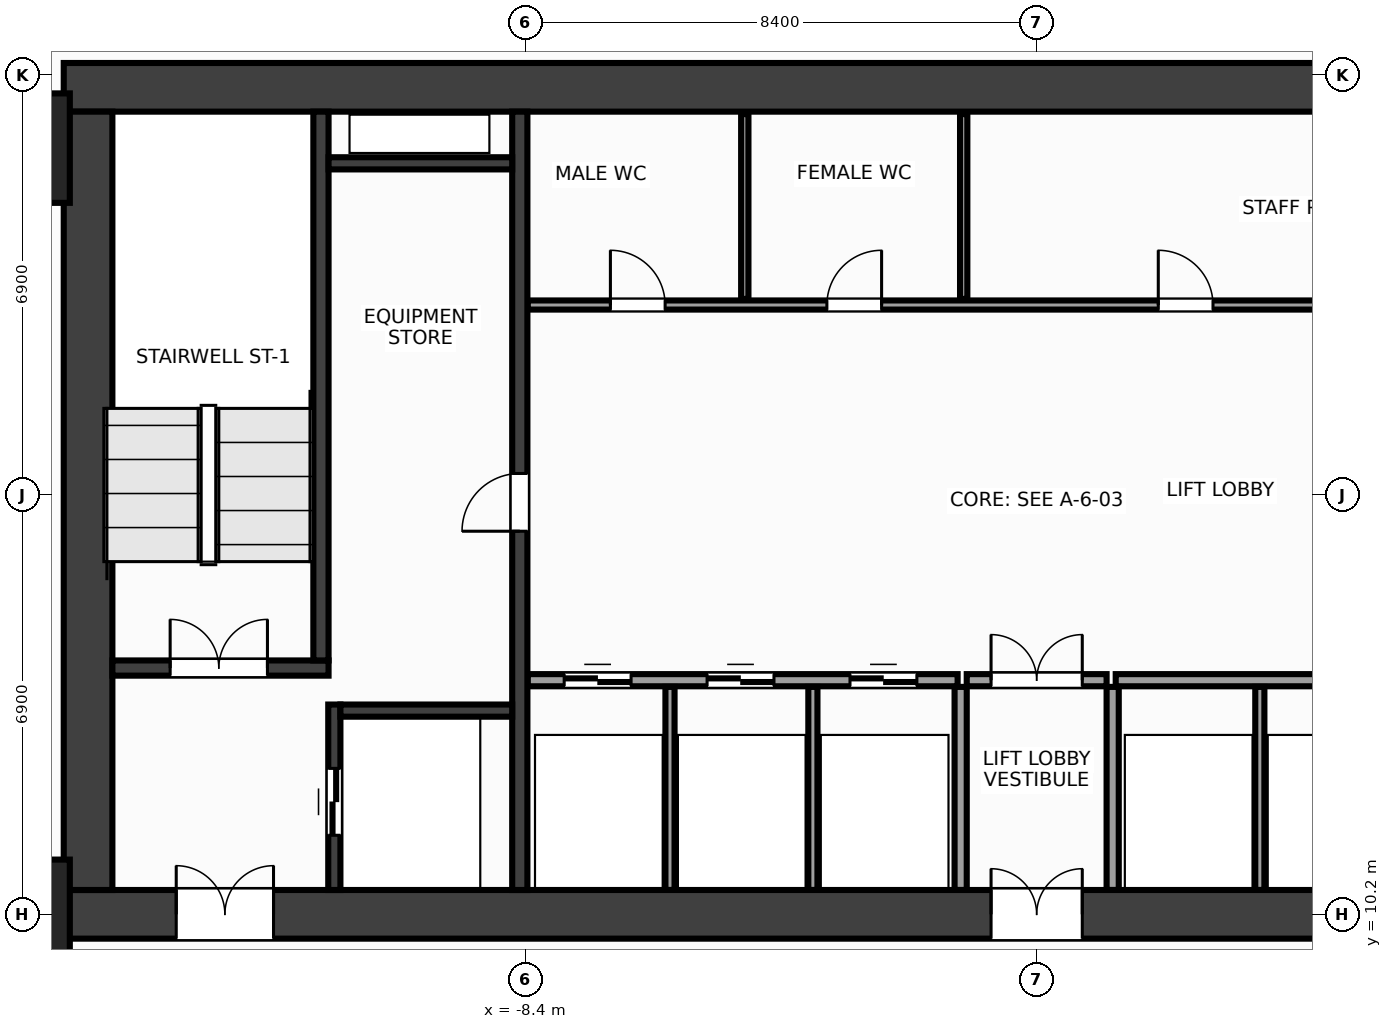
"""IFC4 building model, lengths in metres.
Left out: names, types, materials, properties, quantities, classifications, styles, units other than length and angle.
Written with IfcOpenShell. Run it as: python <this file> out.ifc"""

import sys

from ifc_helpers import new_model, si_unit, direction, frame, frame_2d, origin, origin_2d, place, context, subcontext, project, spatial, rectangle, extrude, source, transform, mapped, element, fill, save


model = new_model("IFC4")
c1 = context("Model", 3, precision=1e-05, world=origin(), true_north=direction((0.0, 1.0)))
c2 = subcontext(c1, "Body", "Model", "MODEL_VIEW")
j1 = project(units=[si_unit("LENGTHUNIT", "METRE"), si_unit("PLANEANGLEUNIT", "RADIAN")], contexts=[c1])
p1 = place(None, origin())
s1 = spatial("IfcSite", under=j1, at=p1, CompositionType="ELEMENT")
p2 = place(p1, origin())
s2 = spatial("IfcBuilding", under=s1, at=p2, CompositionType="ELEMENT")
p3 = place(p2, frame((0.0, 0.0, 63.2)))
s3 = spatial("IfcBuildingStorey", under=s2, at=p3, CompositionType="ELEMENT", Elevation=63.2)
m1 = source(origin(), c2, "Body", "SweptSolid", [
    extrude(rectangle(XDim=32.0, YDim=0.8, at=frame_2d((16.0, 0.0))), origin(), (0.0, 0.0, 1.0), 3.6),
])
p4 = place(p3, frame((-16.0, 23.8, 0.0), z_axis=(0.0, 0.0, 1.0), x_axis=(1.0, 0.0, 0.0)))
e1 = element("IfcWall", 1, at=p4, inside=s3, PredefinedType="SHEAR", context=c2, shape_type="MappedRepresentation", body=[
    mapped(m1, transform((0.0, 0.0, 0.0), x_axis=(1.0, 0.0, 0.0), y_axis=(0.0, 1.0, 0.0), z_axis=(0.0, 0.0, 1.0), scale=1.0)),
])
p5 = place(p3, frame((-16.0, 10.2, 0.0), z_axis=(0.0, 0.0, 1.0), x_axis=(1.0, 0.0, 0.0)))
e2 = element("IfcWall", 2, at=p5, inside=s3, PredefinedType="SHEAR", context=c2, shape_type="MappedRepresentation", body=[
    mapped(m1, transform((0.0, 0.0, 0.0), x_axis=(1.0, 0.0, 0.0), y_axis=(0.0, 1.0, 0.0), z_axis=(0.0, 0.0, 1.0), scale=1.0)),
])
p6 = place(p5, frame((1.85, 0.0, 0.0)))
e3 = element("IfcOpeningElement", 3, at=p6, cuts=e2, PredefinedType="OPENING", context=c2, shape_type="SweptSolid", body=[
    extrude(rectangle(XDim=1.6, YDim=2.15, at=frame_2d((0.8, 1.075))), frame((0.0, 0.412, 0.0), z_axis=(0.0, -1.0, 0.0), x_axis=(1.0, 0.0, 0.0)), (0.0, 0.0, 1.0), 0.824),
])
p7 = place(p5, frame((28.55, 0.0, 0.0)))
e4 = element("IfcOpeningElement", 4, at=p7, cuts=e2, PredefinedType="OPENING", context=c2, shape_type="SweptSolid", body=[
    extrude(rectangle(XDim=1.6, YDim=2.15, at=frame_2d((0.8, 1.075))), frame((0.0, 0.412, 0.0), z_axis=(0.0, -1.0, 0.0), x_axis=(1.0, 0.0, 0.0)), (0.0, 0.0, 1.0), 0.824),
])
p8 = place(p5, frame((15.25, 0.0, 0.0)))
e5 = element("IfcOpeningElement", 5, at=p8, cuts=e2, PredefinedType="OPENING", context=c2, shape_type="SweptSolid", body=[
    extrude(rectangle(XDim=1.5, YDim=2.2, at=frame_2d((0.75, 1.1))), frame((0.0, 0.412, 0.0), z_axis=(0.0, -1.0, 0.0), x_axis=(1.0, 0.0, 0.0)), (0.0, 0.0, 1.0), 0.824),
])
m2 = source(origin(), c2, "Body", "SweptSolid", [
    extrude(rectangle(XDim=12.8, YDim=0.8, at=frame_2d((6.4, 0.0))), origin(), (0.0, 0.0, 1.0), 3.6),
])
p9 = place(p3, frame((-15.6, 10.6, 0.0), z_axis=(0.0, 0.0, 1.0), x_axis=(0.0, 1.0, 0.0)))
e6 = element("IfcWall", 6, at=p9, inside=s3, PredefinedType="SHEAR", context=c2, shape_type="MappedRepresentation", body=[
    mapped(m2, transform((0.0, 0.0, 0.0), x_axis=(1.0, 0.0, 0.0), y_axis=(0.0, 1.0, 0.0), z_axis=(0.0, 0.0, 1.0), scale=1.0)),
])
m3 = source(origin(), c2, "Body", "SweptSolid", [
    extrude(rectangle(XDim=12.8, YDim=0.25, at=frame_2d((6.4, 0.0))), origin(), (0.0, 0.0, 1.0), 3.6),
])
p10 = place(p3, frame((-8.5, 10.6, 0.0), z_axis=(0.0, 0.0, 1.0), x_axis=(0.0, 1.0, 0.0)))
e7 = element("IfcWall", 7, at=p10, inside=s3, PredefinedType="SHEAR", context=c2, shape_type="MappedRepresentation", body=[
    mapped(m3, transform((0.0, 0.0, 0.0), x_axis=(1.0, 0.0, 0.0), y_axis=(0.0, 1.0, 0.0), z_axis=(0.0, 0.0, 1.0), scale=1.0)),
])
p11 = place(p10, frame((5.9, 0.0, 0.0)))
e8 = element("IfcOpeningElement", 8, at=p11, cuts=e7, PredefinedType="OPENING", context=c2, shape_type="SweptSolid", body=[
    extrude(rectangle(XDim=0.95, YDim=2.15, at=frame_2d((0.475, 1.075))), frame((0.0, 0.137, 0.0), z_axis=(0.0, -1.0, 0.0), x_axis=(1.0, 0.0, 0.0)), (0.0, 0.0, 1.0), 0.274),
])
m4 = source(origin(), c2, "Body", "SweptSolid", [
    extrude(rectangle(XDim=3.555, YDim=0.25, at=frame_2d((1.777, 0.0))), origin(), (0.0, 0.0, 1.0), 3.6),
])
p12 = place(p3, frame((-15.2, 14.25, 0.0), z_axis=(0.0, 0.0, 1.0), x_axis=(1.0, 0.0, 0.0)))
e9 = element("IfcWall", 9, at=p12, inside=s3, PredefinedType="SHEAR", context=c2, shape_type="MappedRepresentation", body=[
    mapped(m4, transform((0.0, 0.0, 0.0), x_axis=(1.0, 0.0, 0.0), y_axis=(0.0, 1.0, 0.0), z_axis=(0.0, 0.0, 1.0), scale=1.0)),
])
p13 = place(p12, frame((0.95, 0.0, 0.0)))
e10 = element("IfcOpeningElement", 10, at=p13, cuts=e9, PredefinedType="OPENING", context=c2, shape_type="SweptSolid", body=[
    extrude(rectangle(XDim=1.6, YDim=2.15, at=frame_2d((0.8, 1.075))), frame((0.0, 0.137, 0.0), z_axis=(0.0, -1.0, 0.0), x_axis=(1.0, 0.0, 0.0)), (0.0, 0.0, 1.0), 0.274),
])
m5 = source(origin(), c2, "Body", "SweptSolid", [
    extrude(rectangle(XDim=9.025, YDim=0.25, at=frame_2d((4.512, 0.0))), origin(), (0.0, 0.0, 1.0), 3.6),
])
p14 = place(p3, frame((-11.77, 14.375, 0.0), z_axis=(0.0, 0.0, 1.0), x_axis=(0.0, 1.0, 0.0)))
e11 = element("IfcWall", 11, at=p14, inside=s3, PredefinedType="SHEAR", context=c2, shape_type="MappedRepresentation", body=[
    mapped(m5, transform((0.0, 0.0, 0.0), x_axis=(1.0, 0.0, 0.0), y_axis=(0.0, 1.0, 0.0), z_axis=(0.0, 0.0, 1.0), scale=1.0)),
])
m6 = source(origin(), c2, "Body", "SweptSolid", [
    extrude(rectangle(XDim=3.05, YDim=0.2, at=frame_2d((1.525, 0.0))), origin(), (0.0, 0.0, 1.0), 3.6),
])
p15 = place(p3, frame((-11.55, 10.6, 0.0), z_axis=(0.0, 0.0, 1.0), x_axis=(0.0, 1.0, 0.0)))
e12 = element("IfcWall", 12, at=p15, inside=s3, PredefinedType="SHEAR", context=c2, shape_type="MappedRepresentation", body=[
    mapped(m6, transform((0.0, 0.0, 0.0), x_axis=(1.0, 0.0, 0.0), y_axis=(0.0, 1.0, 0.0), z_axis=(0.0, 0.0, 1.0), scale=1.0)),
])
p16 = place(p15, frame((0.9, 0.0, 0.0)))
e13 = element("IfcOpeningElement", 13, at=p16, cuts=e12, PredefinedType="OPENING", context=c2, shape_type="SweptSolid", body=[
    extrude(rectangle(XDim=1.1, YDim=2.15, at=frame_2d((0.55, 1.075))), frame((0.0, 0.112, 0.0), z_axis=(0.0, -1.0, 0.0), x_axis=(1.0, 0.0, 0.0)), (0.0, 0.0, 1.0), 0.224),
])
m7 = source(origin(), c2, "Body", "SweptSolid", [
    extrude(rectangle(XDim=2.825, YDim=0.2, at=frame_2d((1.413, 0.0))), origin(), (0.0, 0.0, 1.0), 3.6),
])
p17 = place(p3, frame((-11.45, 13.55, 0.0), z_axis=(0.0, 0.0, 1.0), x_axis=(1.0, 0.0, 0.0)))
e14 = element("IfcWall", 14, at=p17, inside=s3, PredefinedType="SHEAR", context=c2, shape_type="MappedRepresentation", body=[
    mapped(m7, transform((0.0, 0.0, 0.0), x_axis=(1.0, 0.0, 0.0), y_axis=(0.0, 1.0, 0.0), z_axis=(0.0, 0.0, 1.0), scale=1.0)),
])
m8 = source(origin(), c2, "Body", "SweptSolid", [
    extrude(rectangle(XDim=3.02, YDim=0.2, at=frame_2d((1.51, 0.0))), origin(), (0.0, 0.0, 1.0), 3.6),
])
p18 = place(p3, frame((-11.645, 22.55, 0.0), z_axis=(0.0, 0.0, 1.0), x_axis=(1.0, 0.0, 0.0)))
e15 = element("IfcWall", 15, at=p18, inside=s3, PredefinedType="SHEAR", context=c2, shape_type="MappedRepresentation", body=[
    mapped(m8, transform((0.0, 0.0, 0.0), x_axis=(1.0, 0.0, 0.0), y_axis=(0.0, 1.0, 0.0), z_axis=(0.0, 0.0, 1.0), scale=1.0)),
])
m9 = source(origin(), c2, "Body", "SweptSolid", [
    extrude(rectangle(XDim=1.8, YDim=1.8, at=origin_2d()), origin(), (0.0, 0.0, 1.0), 3.6),
])
for number, where, z_axis, x_axis in (
    (16, (-16.8, 10.2, 0.0), (0.0, 0.0, 1.0), (1.0, 0.0, 0.0)),
    (17, (-16.8, 22.8, 0.0), (0.0, 0.0, 1.0), (1.0, 0.0, 0.0)),
):
    element("IfcColumn", number, at=place(p3, frame(where, z_axis=z_axis, x_axis=x_axis)), inside=s3, PredefinedType="COLUMN", context=c2, shape_type="MappedRepresentation", body=[
        mapped(m9, transform((0.0, 0.0, 0.0), x_axis=(1.0, 0.0, 0.0), y_axis=(0.0, 1.0, 0.0), z_axis=(0.0, 0.0, 1.0), scale=1.0)),
    ])
m10 = source(origin(), c2, "Body", "SweptSolid", [
    extrude(rectangle(XDim=7.07, YDim=0.2, at=frame_2d((3.535, 0.0))), origin(), (0.0, 0.0, 1.0), 3.36),
])
p19 = place(p3, frame((-8.37, 14.05, 0.0), z_axis=(0.0, 0.0, 1.0), x_axis=(1.0, 0.0, 0.0)))
e18 = element("IfcWall", 18, at=p19, inside=s3, PredefinedType="PARTITIONING", context=c2, shape_type="MappedRepresentation", body=[
    mapped(m10, transform((0.0, 0.0, 0.0), x_axis=(1.0, 0.0, 0.0), y_axis=(0.0, 1.0, 0.0), z_axis=(0.0, 0.0, 1.0), scale=1.0)),
])
p20 = place(p19, frame((0.6, 0.0, 0.0)))
e19 = element("IfcOpeningElement", 19, at=p20, cuts=e18, PredefinedType="OPENING", context=c2, shape_type="SweptSolid", body=[
    extrude(rectangle(XDim=1.1, YDim=2.15, at=frame_2d((0.55, 1.075))), frame((0.0, 0.112, 0.0), z_axis=(0.0, -1.0, 0.0), x_axis=(1.0, 0.0, 0.0)), (0.0, 0.0, 1.0), 0.224),
])
p21 = place(p19, frame((2.95, 0.0, 0.0)))
e20 = element("IfcOpeningElement", 20, at=p21, cuts=e18, PredefinedType="OPENING", context=c2, shape_type="SweptSolid", body=[
    extrude(rectangle(XDim=1.1, YDim=2.15, at=frame_2d((0.55, 1.075))), frame((0.0, 0.112, 0.0), z_axis=(0.0, -1.0, 0.0), x_axis=(1.0, 0.0, 0.0)), (0.0, 0.0, 1.0), 0.224),
])
p22 = place(p19, frame((5.3, 0.0, 0.0)))
e21 = element("IfcOpeningElement", 21, at=p22, cuts=e18, PredefinedType="OPENING", context=c2, shape_type="SweptSolid", body=[
    extrude(rectangle(XDim=1.1, YDim=2.15, at=frame_2d((0.55, 1.075))), frame((0.0, 0.112, 0.0), z_axis=(0.0, -1.0, 0.0), x_axis=(1.0, 0.0, 0.0)), (0.0, 0.0, 1.0), 0.224),
])
p23 = place(p3, frame((1.3, 14.05, 0.0), z_axis=(0.0, 0.0, 1.0), x_axis=(1.0, 0.0, 0.0)))
e22 = element("IfcWall", 22, at=p23, inside=s3, PredefinedType="PARTITIONING", context=c2, shape_type="MappedRepresentation", body=[
    mapped(m10, transform((0.0, 0.0, 0.0), x_axis=(1.0, 0.0, 0.0), y_axis=(0.0, 1.0, 0.0), z_axis=(0.0, 0.0, 1.0), scale=1.0)),
])
m11 = source(origin(), c2, "Body", "SweptSolid", [
    extrude(rectangle(XDim=3.34, YDim=0.2, at=frame_2d((1.67, 0.0))), origin(), (0.0, 0.0, 1.0), 3.36),
])
for number, where, z_axis, x_axis in (
    (23, (-1.25, 10.6, 0.0), (0.0, 0.0, 1.0), (0.0, 1.0, 0.0)),
    (24, (1.25, 10.6, 0.0), (0.0, 0.0, 1.0), (0.0, 1.0, 0.0)),
):
    element("IfcWall", number, at=place(p3, frame(where, z_axis=z_axis, x_axis=x_axis)), inside=s3, PredefinedType="PARTITIONING", context=c2, shape_type="MappedRepresentation", body=[
        mapped(m11, transform((0.0, 0.0, 0.0), x_axis=(1.0, 0.0, 0.0), y_axis=(0.0, 1.0, 0.0), z_axis=(0.0, 0.0, 1.0), scale=1.0)),
    ])
m12 = source(origin(), c2, "Body", "SweptSolid", [
    extrude(rectangle(XDim=2.3, YDim=0.2, at=frame_2d((1.15, 0.0))), origin(), (0.0, 0.0, 1.0), 3.36),
])
p24 = place(p3, frame((-1.15, 14.05, 0.0), z_axis=(0.0, 0.0, 1.0), x_axis=(1.0, 0.0, 0.0)))
e25 = element("IfcWall", 25, at=p24, inside=s3, PredefinedType="PARTITIONING", context=c2, shape_type="MappedRepresentation", body=[
    mapped(m12, transform((0.0, 0.0, 0.0), x_axis=(1.0, 0.0, 0.0), y_axis=(0.0, 1.0, 0.0), z_axis=(0.0, 0.0, 1.0), scale=1.0)),
])
p25 = place(p24, frame((0.4, 0.0, 0.0)))
e26 = element("IfcOpeningElement", 26, at=p25, cuts=e25, PredefinedType="OPENING", context=c2, shape_type="SweptSolid", body=[
    extrude(rectangle(XDim=1.5, YDim=2.2, at=frame_2d((0.75, 1.1))), frame((0.0, 0.112, 0.0), z_axis=(0.0, -1.0, 0.0), x_axis=(1.0, 0.0, 0.0)), (0.0, 0.0, 1.0), 0.224),
])
m13 = source(origin(), c2, "Body", "SweptSolid", [
    extrude(rectangle(XDim=14.59, YDim=0.15, at=frame_2d((7.295, 0.0))), origin(), (0.0, 0.0, 1.0), 3.36),
])
p26 = place(p3, frame((-8.37, 20.22, 0.0), z_axis=(0.0, 0.0, 1.0), x_axis=(1.0, 0.0, 0.0)))
e27 = element("IfcWall", 27, at=p26, inside=s3, PredefinedType="PARTITIONING", context=c2, shape_type="MappedRepresentation", body=[
    mapped(m13, transform((0.0, 0.0, 0.0), x_axis=(1.0, 0.0, 0.0), y_axis=(0.0, 1.0, 0.0), z_axis=(0.0, 0.0, 1.0), scale=1.0)),
])
p27 = place(p26, frame((1.36, 0.0, 0.0)))
e28 = element("IfcOpeningElement", 28, at=p27, cuts=e27, PredefinedType="OPENING", context=c2, shape_type="SweptSolid", body=[
    extrude(rectangle(XDim=0.9, YDim=2.15, at=frame_2d((0.45, 1.075))), frame((0.0, 0.087, 0.0), z_axis=(0.0, -1.0, 0.0), x_axis=(1.0, 0.0, 0.0)), (0.0, 0.0, 1.0), 0.174),
])
p28 = place(p26, frame((4.92, 0.0, 0.0)))
e29 = element("IfcOpeningElement", 29, at=p28, cuts=e27, PredefinedType="OPENING", context=c2, shape_type="SweptSolid", body=[
    extrude(rectangle(XDim=0.9, YDim=2.15, at=frame_2d((0.45, 1.075))), frame((0.0, 0.087, 0.0), z_axis=(0.0, -1.0, 0.0), x_axis=(1.0, 0.0, 0.0)), (0.0, 0.0, 1.0), 0.174),
])
p29 = place(p26, frame((10.37, 0.0, 0.0)))
e30 = element("IfcOpeningElement", 30, at=p29, cuts=e27, PredefinedType="OPENING", context=c2, shape_type="SweptSolid", body=[
    extrude(rectangle(XDim=0.9, YDim=2.15, at=frame_2d((0.45, 1.075))), frame((0.0, 0.087, 0.0), z_axis=(0.0, -1.0, 0.0), x_axis=(1.0, 0.0, 0.0)), (0.0, 0.0, 1.0), 0.174),
])
m14 = source(origin(), c2, "Body", "SweptSolid", [
    extrude(rectangle(XDim=3.34, YDim=0.15, at=frame_2d((1.67, 0.0))), origin(), (0.0, 0.0, 1.0), 3.36),
])
for number, where, z_axis, x_axis in (
    (31, (-6.03, 10.6, 0.0), (0.0, 0.0, 1.0), (0.0, 1.0, 0.0)),
    (32, (-3.68, 10.6, 0.0), (0.0, 0.0, 1.0), (0.0, 1.0, 0.0)),
    (33, (3.67, 10.6, 0.0), (0.0, 0.0, 1.0), (0.0, 1.0, 0.0)),
):
    element("IfcWall", number, at=place(p3, frame(where, z_axis=z_axis, x_axis=x_axis)), inside=s3, PredefinedType="PARTITIONING", context=c2, shape_type="MappedRepresentation", body=[
        mapped(m14, transform((0.0, 0.0, 0.0), x_axis=(1.0, 0.0, 0.0), y_axis=(0.0, 1.0, 0.0), z_axis=(0.0, 0.0, 1.0), scale=1.0)),
    ])
m15 = source(origin(), c2, "Body", "SweptSolid", [
    extrude(rectangle(XDim=3.04, YDim=0.12, at=frame_2d((1.52, 0.0))), origin(), (0.0, 0.0, 1.0), 3.36),
])
for number, where, z_axis, x_axis in (
    (34, (-4.8, 20.32, 0.0), (0.0, 0.0, 1.0), (0.0, 1.0, 0.0)),
    (35, (-1.2, 20.32, 0.0), (0.0, 0.0, 1.0), (0.0, 1.0, 0.0)),
):
    element("IfcWall", number, at=place(p3, frame(where, z_axis=z_axis, x_axis=x_axis)), inside=s3, PredefinedType="PARTITIONING", context=c2, shape_type="MappedRepresentation", body=[
        mapped(m15, transform((0.0, 0.0, 0.0), x_axis=(1.0, 0.0, 0.0), y_axis=(0.0, 1.0, 0.0), z_axis=(0.0, 0.0, 1.0), scale=1.0)),
    ])
m16 = source(origin(), c2, "Body", "SweptSolid", [
    extrude(rectangle(XDim=1.6, YDim=2.15, at=frame_2d((0.8, 1.075))), frame((0.0, 0.025, 0.0), z_axis=(0.0, -1.0, 0.0), x_axis=(1.0, 0.0, 0.0)), (0.0, 0.0, 1.0), 0.05),
])
p30 = place(p13, origin())
e36 = element("IfcDoor", 36, at=p30, inside=s3, OperationType="DOUBLE_DOOR_SINGLE_SWING", PredefinedType="DOOR", context=c2, shape_type="MappedRepresentation", body=[
    mapped(m16, transform((0.0, 0.0, 0.0), x_axis=(1.0, 0.0, 0.0), y_axis=(0.0, 1.0, 0.0), z_axis=(0.0, 0.0, 1.0), scale=1.0)),
])
fill(e10, e36)
p31 = place(p6, origin())
e37 = element("IfcDoor", 37, at=p31, inside=s3, OperationType="DOUBLE_DOOR_SINGLE_SWING", PredefinedType="DOOR", context=c2, shape_type="MappedRepresentation", body=[
    mapped(m16, transform((0.0, 0.0, 0.0), x_axis=(1.0, 0.0, 0.0), y_axis=(0.0, 1.0, 0.0), z_axis=(0.0, 0.0, 1.0), scale=1.0)),
])
fill(e3, e37)
m17 = source(origin(), c2, "Body", "SweptSolid", [
    extrude(rectangle(XDim=1.1, YDim=2.15, at=frame_2d((0.55, 1.075))), frame((0.0, 0.025, 0.0), z_axis=(0.0, -1.0, 0.0), x_axis=(1.0, 0.0, 0.0)), (0.0, 0.0, 1.0), 0.05),
])
p32 = place(p16, origin())
e38 = element("IfcDoor", 38, at=p32, inside=s3, OperationType="DOUBLE_DOOR_SLIDING", PredefinedType="DOOR", context=c2, shape_type="MappedRepresentation", body=[
    mapped(m17, transform((0.0, 0.0, 0.0), x_axis=(1.0, 0.0, 0.0), y_axis=(0.0, 1.0, 0.0), z_axis=(0.0, 0.0, 1.0), scale=1.0)),
])
fill(e13, e38)
m18 = source(origin(), c2, "Body", "SweptSolid", [
    extrude(rectangle(XDim=0.95, YDim=2.15, at=frame_2d((0.475, 1.075))), frame((0.0, 0.025, 0.0), z_axis=(0.0, -1.0, 0.0), x_axis=(1.0, 0.0, 0.0)), (0.0, 0.0, 1.0), 0.05),
])
p33 = place(p11, origin())
e39 = element("IfcDoor", 39, at=p33, inside=s3, OperationType="SINGLE_SWING_LEFT", PredefinedType="DOOR", context=c2, shape_type="MappedRepresentation", body=[
    mapped(m18, transform((0.0, 0.0, 0.0), x_axis=(1.0, 0.0, 0.0), y_axis=(0.0, 1.0, 0.0), z_axis=(0.0, 0.0, 1.0), scale=1.0)),
])
fill(e8, e39)
p34 = place(p20, origin())
e40 = element("IfcDoor", 40, at=p34, inside=s3, OperationType="DOUBLE_DOOR_SLIDING", PredefinedType="DOOR", context=c2, shape_type="MappedRepresentation", body=[
    mapped(m17, transform((0.0, 0.0, 0.0), x_axis=(1.0, 0.0, 0.0), y_axis=(0.0, 1.0, 0.0), z_axis=(0.0, 0.0, 1.0), scale=1.0)),
])
fill(e19, e40)
p35 = place(p21, origin())
e41 = element("IfcDoor", 41, at=p35, inside=s3, OperationType="DOUBLE_DOOR_SLIDING", PredefinedType="DOOR", context=c2, shape_type="MappedRepresentation", body=[
    mapped(m17, transform((0.0, 0.0, 0.0), x_axis=(1.0, 0.0, 0.0), y_axis=(0.0, 1.0, 0.0), z_axis=(0.0, 0.0, 1.0), scale=1.0)),
])
fill(e20, e41)
p36 = place(p22, origin())
e42 = element("IfcDoor", 42, at=p36, inside=s3, OperationType="DOUBLE_DOOR_SLIDING", PredefinedType="DOOR", context=c2, shape_type="MappedRepresentation", body=[
    mapped(m17, transform((0.0, 0.0, 0.0), x_axis=(1.0, 0.0, 0.0), y_axis=(0.0, 1.0, 0.0), z_axis=(0.0, 0.0, 1.0), scale=1.0)),
])
fill(e21, e42)
m19 = source(origin(), c2, "Body", "SweptSolid", [
    extrude(rectangle(XDim=1.5, YDim=2.2, at=frame_2d((0.75, 1.1))), frame((0.0, 0.025, 0.0), z_axis=(0.0, -1.0, 0.0), x_axis=(1.0, 0.0, 0.0)), (0.0, 0.0, 1.0), 0.05),
])
p37 = place(p25, origin())
e43 = element("IfcDoor", 43, at=p37, inside=s3, OperationType="DOUBLE_DOOR_SINGLE_SWING", PredefinedType="DOOR", context=c2, shape_type="MappedRepresentation", body=[
    mapped(m19, transform((0.0, 0.0, 0.0), x_axis=(1.0, 0.0, 0.0), y_axis=(0.0, 1.0, 0.0), z_axis=(0.0, 0.0, 1.0), scale=1.0)),
])
fill(e26, e43)
p38 = place(p8, origin())
e44 = element("IfcDoor", 44, at=p38, inside=s3, OperationType="DOUBLE_DOOR_SINGLE_SWING", PredefinedType="DOOR", context=c2, shape_type="MappedRepresentation", body=[
    mapped(m19, transform((0.0, 0.0, 0.0), x_axis=(1.0, 0.0, 0.0), y_axis=(0.0, 1.0, 0.0), z_axis=(0.0, 0.0, 1.0), scale=1.0)),
])
fill(e5, e44)
m20 = source(origin(), c2, "Body", "SweptSolid", [
    extrude(rectangle(XDim=0.9, YDim=2.15, at=frame_2d((0.45, 1.075))), frame((0.0, 0.025, 0.0), z_axis=(0.0, -1.0, 0.0), x_axis=(1.0, 0.0, 0.0)), (0.0, 0.0, 1.0), 0.05),
])
p39 = place(p27, origin())
e45 = element("IfcDoor", 45, at=p39, inside=s3, OperationType="SINGLE_SWING_LEFT", PredefinedType="DOOR", context=c2, shape_type="MappedRepresentation", body=[
    mapped(m20, transform((0.0, 0.0, 0.0), x_axis=(1.0, 0.0, 0.0), y_axis=(0.0, 1.0, 0.0), z_axis=(0.0, 0.0, 1.0), scale=1.0)),
])
fill(e28, e45)
p40 = place(p28, origin())
e46 = element("IfcDoor", 46, at=p40, inside=s3, OperationType="SINGLE_SWING_RIGHT", PredefinedType="DOOR", context=c2, shape_type="MappedRepresentation", body=[
    mapped(m20, transform((0.0, 0.0, 0.0), x_axis=(1.0, 0.0, 0.0), y_axis=(0.0, 1.0, 0.0), z_axis=(0.0, 0.0, 1.0), scale=1.0)),
])
fill(e29, e46)
p41 = place(p29, origin())
e47 = element("IfcDoor", 47, at=p41, inside=s3, OperationType="SINGLE_SWING_LEFT", PredefinedType="DOOR", context=c2, shape_type="MappedRepresentation", body=[
    mapped(m20, transform((0.0, 0.0, 0.0), x_axis=(1.0, 0.0, 0.0), y_axis=(0.0, 1.0, 0.0), z_axis=(0.0, 0.0, 1.0), scale=1.0)),
])
fill(e30, e47)
save(model, sys.argv[1])
